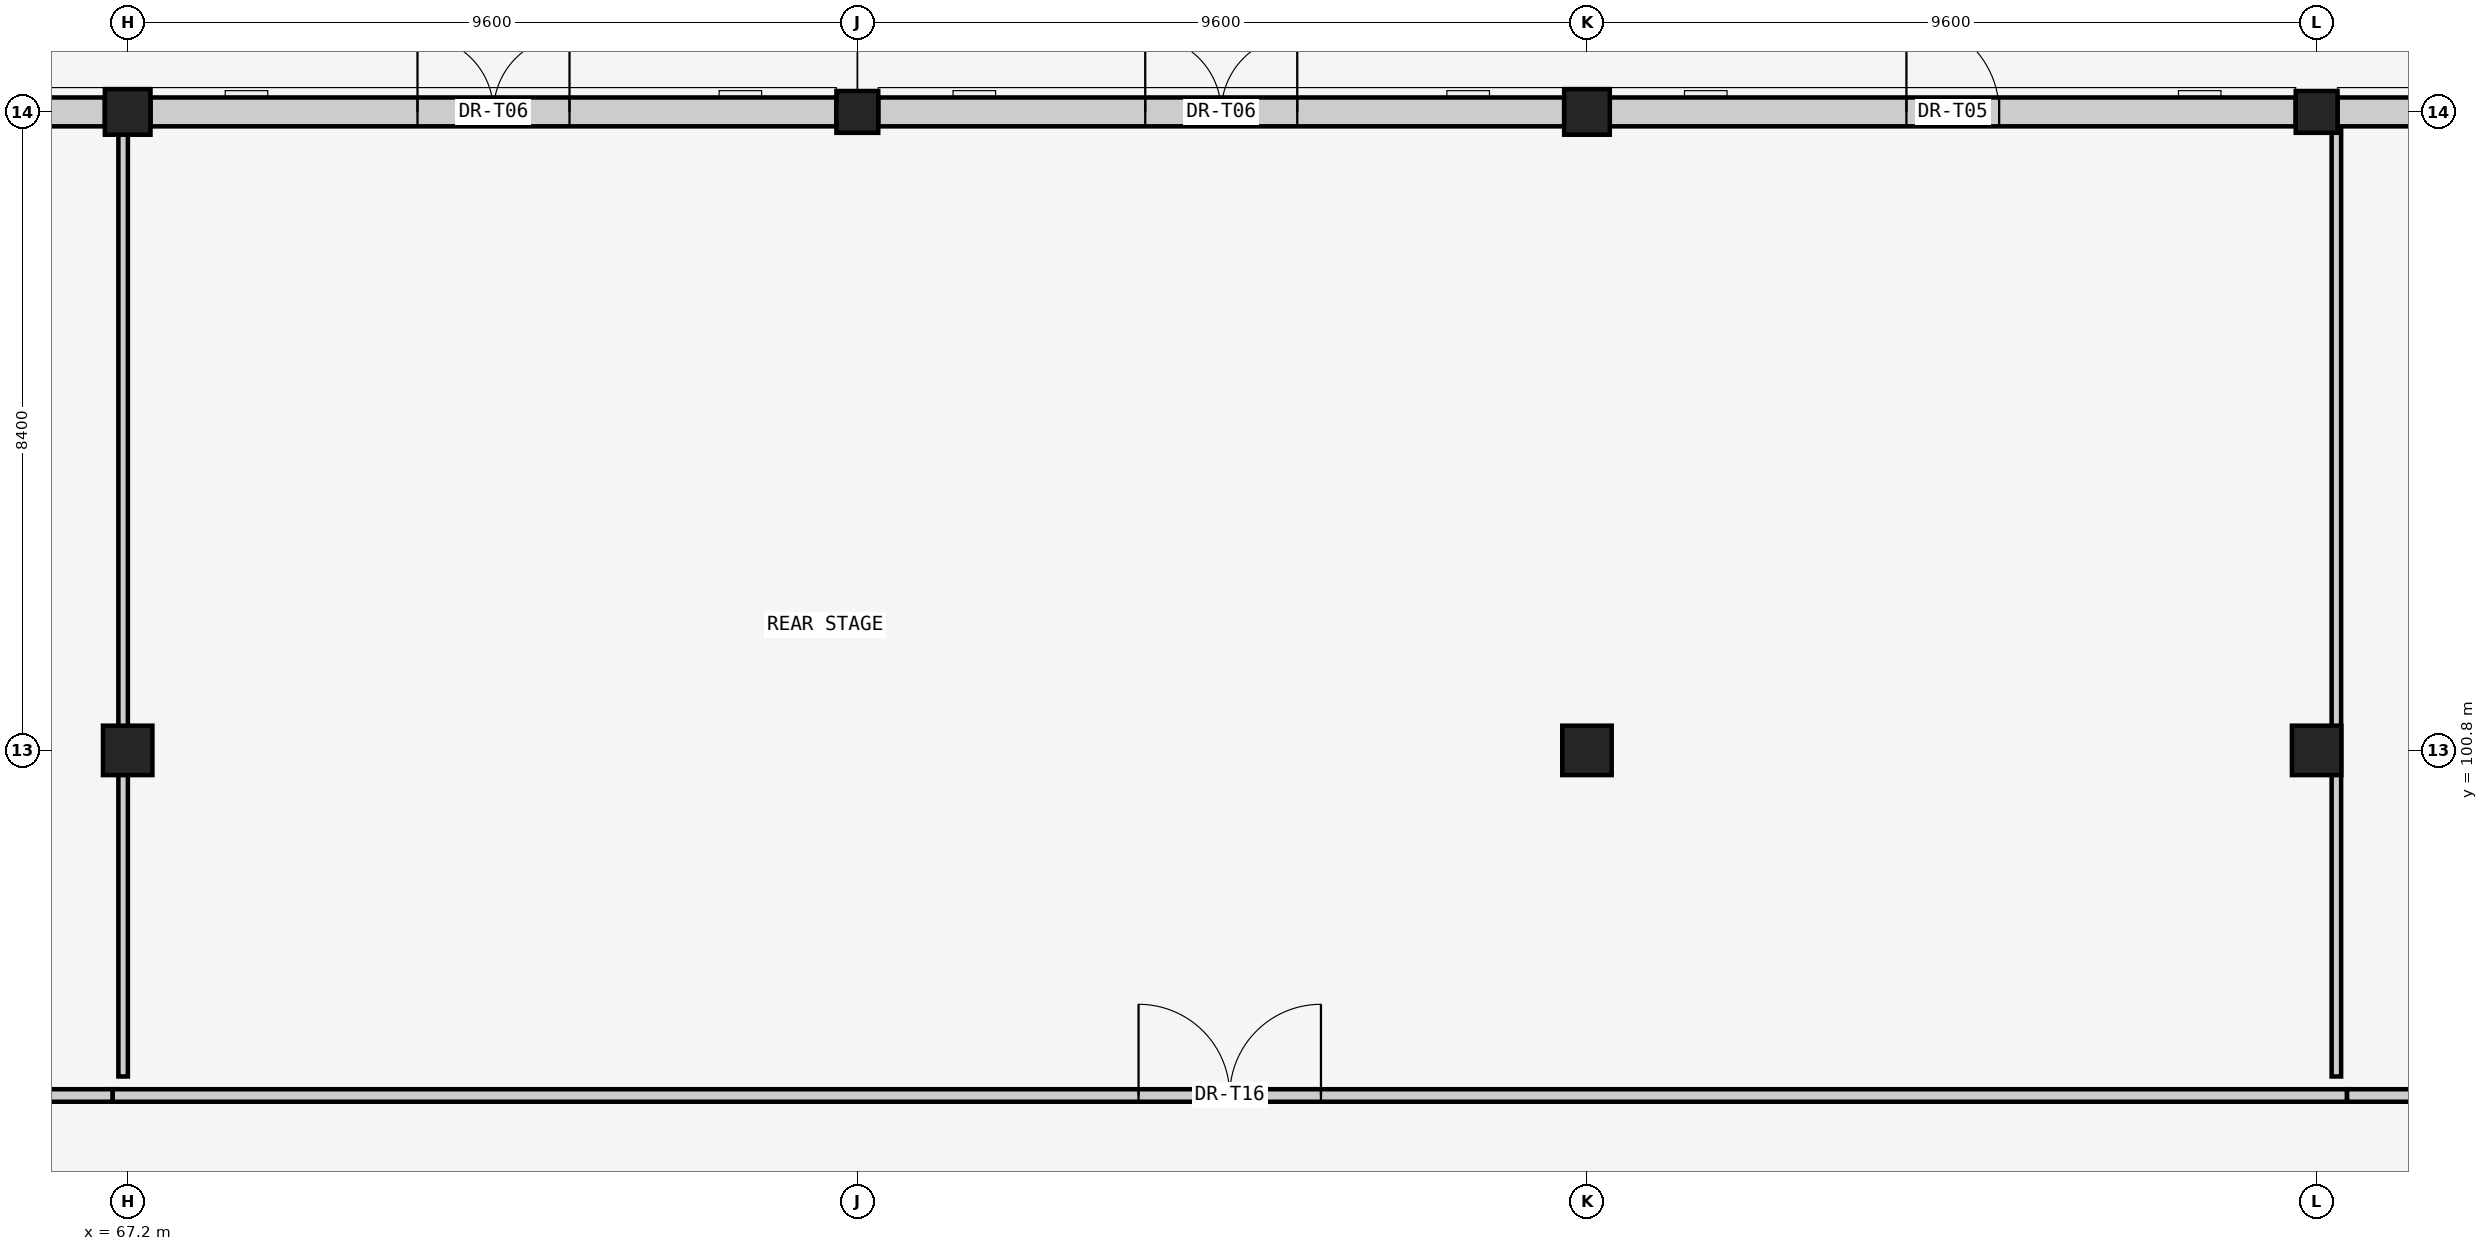
"""IFC4 building model, lengths in metres.
Left out: names, types, materials, properties, quantities, classifications, styles, units other than length and angle.
Written with IfcOpenShell. Run it as: python <this file> out.ifc"""

import sys

from ifc_helpers import new_model, si_unit, direction, frame, frame_2d, origin, origin_2d, place, context, subcontext, project, spatial, rectangle, extrude, element, fill, save


model = new_model("IFC4")
c1 = context("Model", 3, precision=1e-05, world=origin(), true_north=direction((0.0, 1.0)))
c2 = subcontext(c1, "Body", "Model", "MODEL_VIEW")
j1 = project(units=[si_unit("LENGTHUNIT", "METRE"), si_unit("PLANEANGLEUNIT", "RADIAN")], contexts=[c1])
p1 = place(None, origin())
s1 = spatial("IfcSite", under=j1, at=p1, CompositionType="ELEMENT")
p2 = place(p1, origin())
s2 = spatial("IfcBuilding", under=s1, at=p2, CompositionType="ELEMENT")
p3 = place(p2, origin())
s3 = spatial("IfcBuildingStorey", under=s2, at=p3, CompositionType="ELEMENT", Elevation=0.0)
p4 = place(p3, frame((67.2, 100.8, 0.0), z_axis=(0.0, 0.0, 1.0), x_axis=(1.0, 0.0, 0.0)))
e1 = element("IfcColumn", 1, at=p4, inside=s3, PredefinedType="COLUMN", context=c2, shape_type="SweptSolid", body=[
    extrude(rectangle(XDim=0.65, YDim=0.65, at=origin_2d()), origin(), (0.0, 0.0, 1.0), 5.04),
])
p5 = place(p3, frame((67.2, 109.2, 0.0), z_axis=(0.0, 0.0, 1.0), x_axis=(1.0, 0.0, 0.0)))
e2 = element("IfcColumn", 2, at=p5, inside=s3, PredefinedType="COLUMN", context=c2, shape_type="SweptSolid", body=[
    extrude(rectangle(XDim=0.6, YDim=0.6, at=origin_2d()), origin(), (0.0, 0.0, 1.0), 5.13),
])
p6 = place(p3, frame((76.8, 109.2, 0.0), z_axis=(0.0, 0.0, 1.0), x_axis=(1.0, 0.0, 0.0)))
e3 = element("IfcColumn", 3, at=p6, inside=s3, PredefinedType="COLUMN", context=c2, shape_type="SweptSolid", body=[
    extrude(rectangle(XDim=0.55, YDim=0.55, at=origin_2d()), origin(), (0.0, 0.0, 1.0), 5.13),
])
p7 = place(p3, frame((86.4, 100.8, 0.0), z_axis=(0.0, 0.0, 1.0), x_axis=(1.0, 0.0, 0.0)))
e4 = element("IfcColumn", 4, at=p7, inside=s3, PredefinedType="COLUMN", context=c2, shape_type="SweptSolid", body=[
    extrude(rectangle(XDim=0.65, YDim=0.65, at=origin_2d()), origin(), (0.0, 0.0, 1.0), 5.04),
])
p8 = place(p3, frame((86.4, 109.2, 0.0), z_axis=(0.0, 0.0, 1.0), x_axis=(1.0, 0.0, 0.0)))
e5 = element("IfcColumn", 5, at=p8, inside=s3, PredefinedType="COLUMN", context=c2, shape_type="SweptSolid", body=[
    extrude(rectangle(XDim=0.6, YDim=0.6, at=origin_2d()), origin(), (0.0, 0.0, 1.0), 5.13),
])
p9 = place(p3, frame((96.0, 100.8, 0.0), z_axis=(0.0, 0.0, 1.0), x_axis=(1.0, 0.0, 0.0)))
e6 = element("IfcColumn", 6, at=p9, inside=s3, PredefinedType="COLUMN", context=c2, shape_type="SweptSolid", body=[
    extrude(rectangle(XDim=0.65, YDim=0.65, at=origin_2d()), origin(), (0.0, 0.0, 1.0), 5.04),
])
p10 = place(p3, frame((96.0, 109.2, 0.0), z_axis=(0.0, 0.0, 1.0), x_axis=(1.0, 0.0, 0.0)))
e7 = element("IfcColumn", 7, at=p10, inside=s3, PredefinedType="COLUMN", context=c2, shape_type="SweptSolid", body=[
    extrude(rectangle(XDim=0.55, YDim=0.55, at=origin_2d()), origin(), (0.0, 0.0, 1.0), 5.13),
])
p11 = place(p3, frame((57.875, 109.2, 0.0), z_axis=(0.0, 0.0, 1.0), x_axis=(1.0, 0.0, 0.0)))
e8 = element("IfcWall", 8, at=p11, inside=s3, PredefinedType="SOLIDWALL", context=c2, shape_type="SweptSolid", body=[
    extrude(rectangle(XDim=9.025, YDim=0.38, at=frame_2d((4.512, 0.0))), origin(), (0.0, 0.0, 1.0), 4.51),
])
p12 = place(p11, frame((3.903, 0.0, 0.0)))
e9 = element("IfcOpeningElement", 9, at=p12, cuts=e8, PredefinedType="OPENING", context=c2, shape_type="SweptSolid", body=[
    extrude(rectangle(XDim=1.22, YDim=2.25, at=frame_2d((0.61, 1.125))), frame((0.0, 0.2, 0.0), z_axis=(0.0, -1.0, 0.0), x_axis=(1.0, 0.0, 0.0)), (0.0, 0.0, 1.0), 0.4),
])
p13 = place(p3, frame((67.5, 109.2, 0.0), z_axis=(0.0, 0.0, 1.0), x_axis=(1.0, 0.0, 0.0)))
e10 = element("IfcWall", 10, at=p13, inside=s3, PredefinedType="SOLIDWALL", context=c2, shape_type="SweptSolid", body=[
    extrude(rectangle(XDim=9.025, YDim=0.38, at=frame_2d((4.512, 0.0))), origin(), (0.0, 0.0, 1.0), 4.51),
])
p14 = place(p13, frame((3.513, 0.0, 0.0)))
e11 = element("IfcOpeningElement", 11, at=p14, cuts=e10, PredefinedType="OPENING", context=c2, shape_type="SweptSolid", body=[
    extrude(rectangle(XDim=2.0, YDim=2.25, at=frame_2d((1.0, 1.125))), frame((0.0, 0.2, 0.0), z_axis=(0.0, -1.0, 0.0), x_axis=(1.0, 0.0, 0.0)), (0.0, 0.0, 1.0), 0.4),
])
p15 = place(p3, frame((77.075, 109.2, 0.0), z_axis=(0.0, 0.0, 1.0), x_axis=(1.0, 0.0, 0.0)))
e12 = element("IfcWall", 12, at=p15, inside=s3, PredefinedType="SOLIDWALL", context=c2, shape_type="SweptSolid", body=[
    extrude(rectangle(XDim=9.025, YDim=0.38, at=frame_2d((4.513, 0.0))), origin(), (0.0, 0.0, 1.0), 4.51),
])
p16 = place(p15, frame((3.513, 0.0, 0.0)))
e13 = element("IfcOpeningElement", 13, at=p16, cuts=e12, PredefinedType="OPENING", context=c2, shape_type="SweptSolid", body=[
    extrude(rectangle(XDim=2.0, YDim=2.25, at=frame_2d((1.0, 1.125))), frame((0.0, 0.2, 0.0), z_axis=(0.0, -1.0, 0.0), x_axis=(1.0, 0.0, 0.0)), (0.0, 0.0, 1.0), 0.4),
])
p17 = place(p3, frame((86.7, 109.2, 0.0), z_axis=(0.0, 0.0, 1.0), x_axis=(1.0, 0.0, 0.0)))
e14 = element("IfcWall", 14, at=p17, inside=s3, PredefinedType="SOLIDWALL", context=c2, shape_type="SweptSolid", body=[
    extrude(rectangle(XDim=9.025, YDim=0.38, at=frame_2d((4.513, 0.0))), origin(), (0.0, 0.0, 1.0), 4.51),
])
p18 = place(p17, frame((3.903, 0.0, 0.0)))
e15 = element("IfcOpeningElement", 15, at=p18, cuts=e14, PredefinedType="OPENING", context=c2, shape_type="SweptSolid", body=[
    extrude(rectangle(XDim=1.22, YDim=2.25, at=frame_2d((0.61, 1.125))), frame((0.0, 0.2, 0.0), z_axis=(0.0, -1.0, 0.0), x_axis=(1.0, 0.0, 0.0)), (0.0, 0.0, 1.0), 0.4),
])
p19 = place(p3, frame((96.275, 109.2, 0.0), z_axis=(0.0, 0.0, 1.0), x_axis=(1.0, 0.0, 0.0)))
e16 = element("IfcWall", 16, at=p19, inside=s3, PredefinedType="SOLIDWALL", context=c2, shape_type="SweptSolid", body=[
    extrude(rectangle(XDim=9.025, YDim=0.38, at=frame_2d((4.513, 0.0))), origin(), (0.0, 0.0, 1.0), 4.51),
])
p20 = place(p19, frame((2.113, 0.0, 0.0)))
e17 = element("IfcOpeningElement", 17, at=p20, cuts=e16, PredefinedType="OPENING", context=c2, shape_type="SweptSolid", body=[
    extrude(rectangle(XDim=4.8, YDim=4.4, at=frame_2d((2.4, 2.2))), frame((0.0, 0.2, 0.0), z_axis=(0.0, -1.0, 0.0), x_axis=(1.0, 0.0, 0.0)), (0.0, 0.0, 1.0), 0.4),
])
p21 = place(p3, frame((67.0, 96.26, 0.0), z_axis=(0.0, 0.0, 1.0), x_axis=(1.0, 0.0, 0.0)))
e18 = element("IfcWall", 18, at=p21, inside=s3, PredefinedType="PARTITIONING", context=c2, shape_type="SweptSolid", body=[
    extrude(rectangle(XDim=29.4, YDim=0.165, at=frame_2d((14.7, 0.0))), origin(), (0.0, 0.0, 1.0), 4.99),
])
p22 = place(p21, frame((13.5, 0.0, 0.0)))
e19 = element("IfcOpeningElement", 19, at=p22, cuts=e18, PredefinedType="OPENING", context=c2, shape_type="SweptSolid", body=[
    extrude(rectangle(XDim=2.4, YDim=2.8, at=frame_2d((1.2, 1.4))), frame((0.0, 0.093, 0.0), z_axis=(0.0, -1.0, 0.0), x_axis=(1.0, 0.0, 0.0)), (0.0, 0.0, 1.0), 0.185),
])
p23 = place(p3, frame((61.4, 96.26, 0.0), z_axis=(0.0, 0.0, 1.0), x_axis=(1.0, 0.0, 0.0)))
e20 = element("IfcWall", 20, at=p23, inside=s3, PredefinedType="PARTITIONING", context=c2, shape_type="SweptSolid", body=[
    extrude(rectangle(XDim=5.6, YDim=0.165, at=frame_2d((2.8, 0.0))), origin(), (0.0, 0.0, 1.0), 4.99),
])
p24 = place(p23, frame((1.7, 0.0, 0.0)))
e21 = element("IfcOpeningElement", 21, at=p24, cuts=e20, PredefinedType="OPENING", context=c2, shape_type="SweptSolid", body=[
    extrude(rectangle(XDim=2.2, YDim=2.6, at=frame_2d((1.1, 1.3))), frame((0.0, 0.093, 0.0), z_axis=(0.0, -1.0, 0.0), x_axis=(1.0, 0.0, 0.0)), (0.0, 0.0, 1.0), 0.185),
])
p25 = place(p3, frame((96.4, 96.26, 0.0), z_axis=(0.0, 0.0, 1.0), x_axis=(1.0, 0.0, 0.0)))
e22 = element("IfcWall", 22, at=p25, inside=s3, PredefinedType="PARTITIONING", context=c2, shape_type="SweptSolid", body=[
    extrude(rectangle(XDim=28.15, YDim=0.165, at=frame_2d((14.075, 0.0))), origin(), (0.0, 0.0, 1.0), 4.99),
])
p26 = place(p25, frame((12.875, 0.0, 0.0)))
e23 = element("IfcOpeningElement", 23, at=p26, cuts=e22, PredefinedType="OPENING", context=c2, shape_type="SweptSolid", body=[
    extrude(rectangle(XDim=2.4, YDim=2.8, at=frame_2d((1.2, 1.4))), frame((0.0, 0.093, 0.0), z_axis=(0.0, -1.0, 0.0), x_axis=(1.0, 0.0, 0.0)), (0.0, 0.0, 1.0), 0.185),
])
p27 = place(p3, frame((67.14, 96.51, 0.0), z_axis=(0.0, 0.0, 1.0), x_axis=(0.0, 1.0, 0.0)))
e24 = element("IfcWall", 24, at=p27, inside=s3, PredefinedType="PARTITIONING", context=c2, shape_type="SweptSolid", body=[
    extrude(rectangle(XDim=12.47, YDim=0.125, at=frame_2d((6.235, 0.0))), origin(), (0.0, 0.0, 1.0), 4.32),
])
p28 = place(p3, frame((96.26, 96.51, 0.0), z_axis=(0.0, 0.0, 1.0), x_axis=(0.0, 1.0, 0.0)))
e25 = element("IfcWall", 25, at=p28, inside=s3, PredefinedType="PARTITIONING", context=c2, shape_type="SweptSolid", body=[
    extrude(rectangle(XDim=12.47, YDim=0.125, at=frame_2d((6.235, 0.0))), origin(), (0.0, 0.0, 1.0), 4.99),
])
p29 = place(p14, origin())
e26 = element("IfcDoor", 26, at=p29, inside=s3, OperationType="DOUBLE_DOOR_SINGLE_SWING", PredefinedType="DOOR", context=c2, shape_type="SweptSolid", body=[
    extrude(rectangle(XDim=2.0, YDim=2.25, at=frame_2d((1.0, 1.125))), frame((0.0, 0.025, 0.0), z_axis=(0.0, -1.0, 0.0), x_axis=(1.0, 0.0, 0.0)), (0.0, 0.0, 1.0), 0.05),
])
fill(e11, e26)
p30 = place(p16, origin())
e27 = element("IfcDoor", 27, at=p30, inside=s3, OperationType="DOUBLE_DOOR_SINGLE_SWING", PredefinedType="DOOR", context=c2, shape_type="SweptSolid", body=[
    extrude(rectangle(XDim=2.0, YDim=2.25, at=frame_2d((1.0, 1.125))), frame((0.0, 0.025, 0.0), z_axis=(0.0, -1.0, 0.0), x_axis=(1.0, 0.0, 0.0)), (0.0, 0.0, 1.0), 0.05),
])
fill(e13, e27)
p31 = place(p18, origin())
e28 = element("IfcDoor", 28, at=p31, inside=s3, OperationType="SINGLE_SWING_LEFT", PredefinedType="DOOR", context=c2, shape_type="SweptSolid", body=[
    extrude(rectangle(XDim=1.22, YDim=2.25, at=frame_2d((0.61, 1.125))), frame((0.0, 0.025, 0.0), z_axis=(0.0, -1.0, 0.0), x_axis=(1.0, 0.0, 0.0)), (0.0, 0.0, 1.0), 0.05),
])
fill(e15, e28)
p32 = place(p22, origin())
e29 = element("IfcDoor", 29, at=p32, inside=s3, OperationType="DOUBLE_SWING_LEFT", PredefinedType="DOOR", context=c2, shape_type="SweptSolid", body=[
    extrude(rectangle(XDim=2.4, YDim=2.8, at=frame_2d((1.2, 1.4))), frame((0.0, 0.025, 0.0), z_axis=(0.0, -1.0, 0.0), x_axis=(1.0, 0.0, 0.0)), (0.0, 0.0, 1.0), 0.05),
])
fill(e19, e29)
save(model, sys.argv[1])
